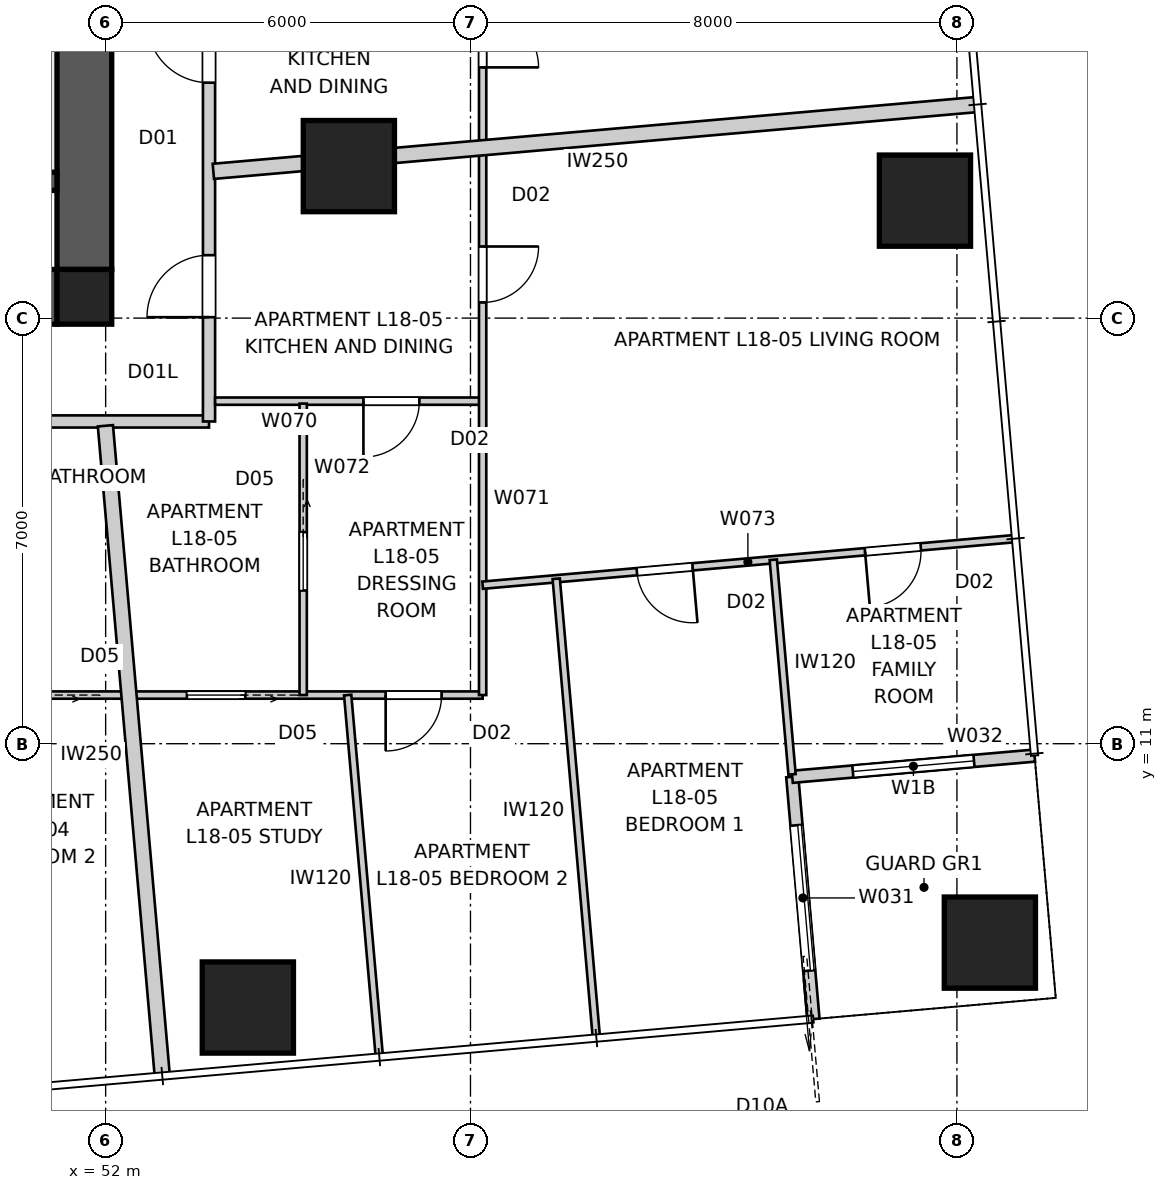
"""IFC4 building model, lengths in metres.
Left out: names, types, materials, properties, quantities, classifications, styles, units other than length and angle.
Written with IfcOpenShell. Run it as: python <this file> out.ifc"""

import sys

from ifc_helpers import new_model, si_unit, direction, frame, frame_2d, origin, origin_2d, place, context, subcontext, project, spatial, polyline, rectangle, outline, extrude, element, fill, save


model = new_model("IFC4")
c1 = context("Model", 3, precision=1e-05, world=origin(), true_north=direction((0.0, 1.0)))
c2 = subcontext(c1, "Body", "Model", "MODEL_VIEW")
j1 = project(units=[si_unit("LENGTHUNIT", "METRE"), si_unit("PLANEANGLEUNIT", "RADIAN")], contexts=[c1])
p1 = place(None, origin())
s1 = spatial("IfcSite", under=j1, at=p1, CompositionType="ELEMENT")
p2 = place(p1, origin())
s2 = spatial("IfcBuilding", under=s1, at=p2, CompositionType="ELEMENT")
p3 = place(p2, frame((0.0, 0.0, 67.6)))
s3 = spatial("IfcBuildingStorey", under=s2, at=p3, CompositionType="ELEMENT", Elevation=67.6)
p4 = place(p3, frame((51.2, 18.35, 0.0), z_axis=(0.0, 0.0, 1.0), x_axis=(-1.0, 0.0, 0.0)))
e1 = element("IfcWall", 1, at=p4, inside=s3, PredefinedType="SHEAR", context=c2, shape_type="SweptSolid", body=[
    extrude(outline(polyline([(0.0, -0.45), (22.4, -0.45), (22.4, -0.025), (22.85, -0.025), (22.85, 0.025), (22.4, 0.025), (22.4, 0.45), (0.0, 0.45), (0.0, 0.025), (-0.45, 0.025), (-0.45, -0.025), (0.0, -0.025), (0.0, -0.45)])), origin(), (0.0, 0.0, 1.0), 3.4),
])
p5 = place(p3, frame((51.65, 18.8, 0.0), z_axis=(0.0, 0.0, 1.0), x_axis=(0.0, 1.0, 0.0)))
e2 = element("IfcWall", 2, at=p5, inside=s3, PredefinedType="SHEAR", context=c2, shape_type="SweptSolid", body=[
    extrude(outline(polyline([(0.0, -0.45), (22.4, -0.45), (22.4, -0.025), (22.85, -0.025), (22.85, 0.025), (22.4, 0.025), (22.4, 0.45), (0.0, 0.45), (0.0, 0.025), (-0.45, 0.025), (-0.45, -0.025), (0.0, -0.025), (0.0, -0.45)])), origin(), (0.0, 0.0, 1.0), 3.4),
])
p6 = place(p5, frame((11.14, 0.0, 0.0)))
e3 = element("IfcOpeningElement", 3, at=p6, cuts=e2, PredefinedType="OPENING", context=c2, shape_type="SweptSolid", body=[
    extrude(rectangle(XDim=1.02, YDim=2.4, at=frame_2d((0.51, 1.2))), frame((0.0, 0.46, 0.0), z_axis=(0.0, -1.0, 0.0), x_axis=(1.0, 0.0, 0.0)), (0.0, 0.0, 1.0), 0.92),
])
p7 = place(p3, frame((51.2, 20.25, 0.0), z_axis=(0.0, 0.0, 1.0), x_axis=(-1.0, 0.0, 0.0)))
e4 = element("IfcWall", 4, at=p7, inside=s3, PredefinedType="SHEAR", context=c2, shape_type="SweptSolid", body=[
    extrude(rectangle(XDim=3.5, YDim=0.3, at=frame_2d((1.75, 0.0))), origin(), (0.0, 0.0, 1.0), 3.4),
])
p8 = place(p3, frame((51.65, 18.35, 0.0), z_axis=(0.0, 0.0, 1.0), x_axis=(1.0, 0.0, 0.0)))
e5 = element("IfcColumn", 5, at=p8, inside=s3, PredefinedType="COLUMN", context=c2, shape_type="SweptSolid", body=[
    extrude(rectangle(XDim=0.9, YDim=0.9, at=origin_2d()), origin(), (0.0, 0.0, 1.0), 3.4),
])
for number, where, z_axis, x_axis in (
    (6, (54.339, 6.661, 0.0), (0.0, 0.0, 1.0), (1.0, 0.0, 0.0)),
    (7, (66.542, 7.729, 0.0), (0.0, 0.0, 1.0), (1.0, 0.0, 0.0)),
    (8, (65.474, 19.932, 0.0), (0.0, 0.0, 1.0), (1.0, 0.0, 0.0)),
    (9, (56.0, 20.5, 0.0), (0.0, 0.0, 1.0), (1.0, 0.0, 0.0)),
):
    element("IfcColumn", number, at=place(p3, frame(where, z_axis=z_axis, x_axis=x_axis)), inside=s3, PredefinedType="COLUMN", context=c2, shape_type="SweptSolid", body=[
        extrude(rectangle(XDim=1.5, YDim=1.5, at=origin_2d()), origin(), (0.0, 0.0, 1.0), 3.4),
    ])
p9 = place(p3, frame((63.641, 6.471, 0.0), z_axis=(0.0, 0.0, 1.0), x_axis=(-0.087161650072, 0.99619418125, 0.0)))
e10 = element("IfcWall", 10, at=p9, inside=s3, PredefinedType="SOLIDWALL", context=c2, shape_type="SweptSolid", body=[
    extrude(rectangle(XDim=4.0, YDim=0.2, at=frame_2d((2.0, 0.0))), origin(), (0.0, 0.0, 1.0), 3.25),
])
p10 = place(p9, frame((0.8, 0.0, 0.0)))
e11 = element("IfcOpeningElement", 11, at=p10, cuts=e10, PredefinedType="OPENING", context=c2, shape_type="SweptSolid", body=[
    extrude(rectangle(XDim=2.4, YDim=2.1, at=frame_2d((1.2, 1.05))), frame((0.0, 0.11, 0.0), z_axis=(0.0, -1.0, 0.0), x_axis=(1.0, 0.0, 0.0)), (0.0, 0.0, 1.0), 0.22),
])
p11 = place(p3, frame((63.292, 10.456, 0.0), z_axis=(0.0, 0.0, 1.0), x_axis=(0.99619464492, 0.087156350505, 0.0)))
e12 = element("IfcWall", 12, at=p11, inside=s3, PredefinedType="SOLIDWALL", context=c2, shape_type="SweptSolid", body=[
    extrude(rectangle(XDim=4.0, YDim=0.2, at=frame_2d((2.0, 0.0))), origin(), (0.0, 0.0, 1.0), 3.25),
])
p12 = place(p11, frame((1.0, 0.0, 0.45)))
e13 = element("IfcOpeningElement", 13, at=p12, cuts=e12, PredefinedType="OPENING", context=c2, shape_type="SweptSolid", body=[
    extrude(rectangle(XDim=2.0, YDim=1.8, at=frame_2d((1.0, 0.9))), frame((0.0, 0.11, 0.0), z_axis=(0.0, -1.0, 0.0), x_axis=(1.0, 0.0, 0.0)), (0.0, 0.0, 1.0), 0.22),
])
p13 = place(p3, frame((25.5, 16.3, 0.0), z_axis=(0.0, 0.0, 1.0), x_axis=(1.0, 0.0, 0.0)))
e14 = element("IfcWall", 14, at=p13, inside=s3, PredefinedType="PARTITIONING", context=c2, shape_type="SweptSolid", body=[
    extrude(rectangle(XDim=28.2, YDim=0.2, at=frame_2d((14.1, 0.0))), origin(), (0.0, 0.0, 1.0), 3.25),
])
p14 = place(p13, frame((19.784, 0.0, 0.0)))
e15 = element("IfcOpeningElement", 15, at=p14, cuts=e14, PredefinedType="OPENING", context=c2, shape_type="SweptSolid", body=[
    extrude(rectangle(XDim=1.02, YDim=2.34, at=frame_2d((0.51, 1.17))), frame((0.0, 0.11, 0.0), z_axis=(0.0, -1.0, 0.0), x_axis=(1.0, 0.0, 0.0)), (0.0, 0.0, 1.0), 0.22),
])
p15 = place(p13, frame((13.086, 0.0, 0.0)))
e16 = element("IfcOpeningElement", 16, at=p15, cuts=e14, PredefinedType="OPENING", context=c2, shape_type="SweptSolid", body=[
    extrude(rectangle(XDim=1.02, YDim=2.34, at=frame_2d((0.51, 1.17))), frame((0.0, 0.11, 0.0), z_axis=(0.0, -1.0, 0.0), x_axis=(1.0, 0.0, 0.0)), (0.0, 0.0, 1.0), 0.22),
])
p16 = place(p13, frame((2.483, 0.0, 0.0)))
e17 = element("IfcOpeningElement", 17, at=p16, cuts=e14, PredefinedType="OPENING", context=c2, shape_type="SweptSolid", body=[
    extrude(rectangle(XDim=1.02, YDim=2.1, at=frame_2d((0.51, 1.05))), frame((0.0, 0.11, 0.0), z_axis=(0.0, -1.0, 0.0), x_axis=(1.0, 0.0, 0.0)), (0.0, 0.0, 1.0), 0.22),
])
p17 = place(p3, frame((53.7, 16.3, 0.0), z_axis=(0.0, 0.0, 1.0), x_axis=(0.0, 1.0, 0.0)))
e18 = element("IfcWall", 18, at=p17, inside=s3, PredefinedType="PARTITIONING", context=c2, shape_type="SweptSolid", body=[
    extrude(rectangle(XDim=28.2, YDim=0.2, at=frame_2d((14.1, 0.0))), origin(), (0.0, 0.0, 1.0), 3.25),
])
p18 = place(p17, frame((15.716, 0.0, 0.0)))
e19 = element("IfcOpeningElement", 19, at=p18, cuts=e18, PredefinedType="OPENING", context=c2, shape_type="SweptSolid", body=[
    extrude(rectangle(XDim=1.02, YDim=2.34, at=frame_2d((0.51, 1.17))), frame((0.0, 0.11, 0.0), z_axis=(0.0, -1.0, 0.0), x_axis=(1.0, 0.0, 0.0)), (0.0, 0.0, 1.0), 0.22),
])
p19 = place(p17, frame((5.572, 0.0, 0.0)))
e20 = element("IfcOpeningElement", 20, at=p19, cuts=e18, PredefinedType="OPENING", context=c2, shape_type="SweptSolid", body=[
    extrude(rectangle(XDim=1.02, YDim=2.34, at=frame_2d((0.51, 1.17))), frame((0.0, 0.11, 0.0), z_axis=(0.0, -1.0, 0.0), x_axis=(1.0, 0.0, 0.0)), (0.0, 0.0, 1.0), 0.22),
])
p20 = place(p17, frame((1.715, 0.0, 0.0)))
e21 = element("IfcOpeningElement", 21, at=p20, cuts=e18, PredefinedType="OPENING", context=c2, shape_type="SweptSolid", body=[
    extrude(rectangle(XDim=1.02, YDim=2.1, at=frame_2d((0.51, 1.05))), frame((0.0, 0.11, 0.0), z_axis=(0.0, -1.0, 0.0), x_axis=(1.0, 0.0, 0.0)), (0.0, 0.0, 1.0), 0.22),
])
p21 = place(p3, frame((52.932, 5.534, 0.0), z_axis=(0.0, 0.0, 1.0), x_axis=(-0.08716441141, 0.996193939644, 0.0)))
e22 = element("IfcWall", 22, at=p21, inside=s3, PredefinedType="PARTITIONING", context=c2, shape_type="SweptSolid", body=[
    extrude(rectangle(XDim=10.736, YDim=0.25, at=frame_2d((5.368, 0.0))), origin(), (0.0, 0.0, 1.0), 3.25),
])
p22 = place(p3, frame((66.34, 21.513, 0.0), z_axis=(0.0, 0.0, 1.0), x_axis=(-0.996194851608, -0.087153988028, 0.0)))
e23 = element("IfcWall", 23, at=p22, inside=s3, PredefinedType="PARTITIONING", context=c2, shape_type="SweptSolid", body=[
    extrude(rectangle(XDim=12.617, YDim=0.25, at=frame_2d((6.309, 0.0))), origin(), (0.0, 0.0, 1.0), 3.25),
])
p23 = place(p3, frame((58.2, 11.8, 0.0), z_axis=(0.0, 0.0, 1.0), x_axis=(-1.0, 0.0, 0.0)))
e24 = element("IfcWall", 24, at=p23, inside=s3, PredefinedType="PARTITIONING", context=c2, shape_type="SweptSolid", body=[
    extrude(rectangle(XDim=36.4, YDim=0.12, at=frame_2d((18.2, 0.0))), origin(), (0.0, 0.0, 1.0), 3.25),
])
p24 = place(p23, frame((11.12, 0.0, 0.0)))
e25 = element("IfcOpeningElement", 25, at=p24, cuts=e24, PredefinedType="OPENING", context=c2, shape_type="SweptSolid", body=[
    extrude(rectangle(XDim=0.92, YDim=2.34, at=frame_2d((0.46, 1.17))), frame((0.0, 0.07, 0.0), z_axis=(0.0, -1.0, 0.0), x_axis=(1.0, 0.0, 0.0)), (0.0, 0.0, 1.0), 0.14),
])
p25 = place(p23, frame((17.971, 0.0, 0.0)))
e26 = element("IfcOpeningElement", 26, at=p25, cuts=e24, PredefinedType="OPENING", context=c2, shape_type="SweptSolid", body=[
    extrude(rectangle(XDim=0.92, YDim=2.34, at=frame_2d((0.46, 1.17))), frame((0.0, 0.07, 0.0), z_axis=(0.0, -1.0, 0.0), x_axis=(1.0, 0.0, 0.0)), (0.0, 0.0, 1.0), 0.14),
])
p26 = place(p23, frame((28.877, 0.0, 0.0)))
e27 = element("IfcOpeningElement", 27, at=p26, cuts=e24, PredefinedType="OPENING", context=c2, shape_type="SweptSolid", body=[
    extrude(rectangle(XDim=0.92, YDim=2.34, at=frame_2d((0.46, 1.17))), frame((0.0, 0.07, 0.0), z_axis=(0.0, -1.0, 0.0), x_axis=(1.0, 0.0, 0.0)), (0.0, 0.0, 1.0), 0.14),
])
p27 = place(p23, frame((7.16, 0.0, 0.0)))
e28 = element("IfcOpeningElement", 28, at=p27, cuts=e24, PredefinedType="OPENING", context=c2, shape_type="SweptSolid", body=[
    extrude(rectangle(XDim=0.96, YDim=2.1, at=frame_2d((0.48, 1.05))), frame((0.0, 0.07, 0.0), z_axis=(0.0, -1.0, 0.0), x_axis=(1.0, 0.0, 0.0)), (0.0, 0.0, 1.0), 0.14),
])
p28 = place(p23, frame((15.181, 0.0, 0.0)))
e29 = element("IfcOpeningElement", 29, at=p28, cuts=e24, PredefinedType="OPENING", context=c2, shape_type="SweptSolid", body=[
    extrude(rectangle(XDim=0.96, YDim=2.1, at=frame_2d((0.48, 1.05))), frame((0.0, 0.07, 0.0), z_axis=(0.0, -1.0, 0.0), x_axis=(1.0, 0.0, 0.0)), (0.0, 0.0, 1.0), 0.14),
])
p29 = place(p23, frame((32.668, 0.0, 0.0)))
e30 = element("IfcOpeningElement", 30, at=p29, cuts=e24, PredefinedType="OPENING", context=c2, shape_type="SweptSolid", body=[
    extrude(rectangle(XDim=0.92, YDim=2.34, at=frame_2d((0.46, 1.17))), frame((0.0, 0.07, 0.0), z_axis=(0.0, -1.0, 0.0), x_axis=(1.0, 0.0, 0.0)), (0.0, 0.0, 1.0), 0.14),
])
p30 = place(p23, frame((35.011, 0.0, 0.0)))
e31 = element("IfcOpeningElement", 31, at=p30, cuts=e24, PredefinedType="OPENING", context=c2, shape_type="SweptSolid", body=[
    extrude(rectangle(XDim=0.92, YDim=2.34, at=frame_2d((0.46, 1.17))), frame((0.0, 0.07, 0.0), z_axis=(0.0, -1.0, 0.0), x_axis=(1.0, 0.0, 0.0)), (0.0, 0.0, 1.0), 0.14),
])
p31 = place(p23, frame((0.675, 0.0, 0.0)))
e32 = element("IfcOpeningElement", 32, at=p31, cuts=e24, PredefinedType="OPENING", context=c2, shape_type="SweptSolid", body=[
    extrude(rectangle(XDim=0.92, YDim=2.34, at=frame_2d((0.46, 1.17))), frame((0.0, 0.07, 0.0), z_axis=(0.0, -1.0, 0.0), x_axis=(1.0, 0.0, 0.0)), (0.0, 0.0, 1.0), 0.14),
])
p32 = place(p23, frame((25.11, 0.0, 0.0)))
e33 = element("IfcOpeningElement", 33, at=p32, cuts=e24, PredefinedType="OPENING", context=c2, shape_type="SweptSolid", body=[
    extrude(rectangle(XDim=0.96, YDim=2.1, at=frame_2d((0.48, 1.05))), frame((0.0, 0.07, 0.0), z_axis=(0.0, -1.0, 0.0), x_axis=(1.0, 0.0, 0.0)), (0.0, 0.0, 1.0), 0.14),
])
p33 = place(p23, frame((3.904, 0.0, 0.0)))
e34 = element("IfcOpeningElement", 34, at=p33, cuts=e24, PredefinedType="OPENING", context=c2, shape_type="SweptSolid", body=[
    extrude(rectangle(XDim=0.96, YDim=2.1, at=frame_2d((0.48, 1.05))), frame((0.0, 0.07, 0.0), z_axis=(0.0, -1.0, 0.0), x_axis=(1.0, 0.0, 0.0)), (0.0, 0.0, 1.0), 0.14),
])
p34 = place(p3, frame((58.2, 16.634, 0.0), z_axis=(0.0, 0.0, 1.0), x_axis=(-1.0, 0.0, 0.0)))
e35 = element("IfcWall", 35, at=p34, inside=s3, PredefinedType="PARTITIONING", context=c2, shape_type="SweptSolid", body=[
    extrude(rectangle(XDim=4.4, YDim=0.12, at=frame_2d((2.2, 0.0))), origin(), (0.0, 0.0, 1.0), 3.25),
])
p35 = place(p34, frame((1.041, 0.0, 0.0)))
e36 = element("IfcOpeningElement", 36, at=p35, cuts=e35, PredefinedType="OPENING", context=c2, shape_type="SweptSolid", body=[
    extrude(rectangle(XDim=0.92, YDim=2.34, at=frame_2d((0.46, 1.17))), frame((0.0, 0.07, 0.0), z_axis=(0.0, -1.0, 0.0), x_axis=(1.0, 0.0, 0.0)), (0.0, 0.0, 1.0), 0.14),
])
p36 = place(p3, frame((58.2, 24.366, 0.0), z_axis=(0.0, 0.0, 1.0), x_axis=(0.0, -1.0, 0.0)))
e37 = element("IfcWall", 37, at=p36, inside=s3, PredefinedType="PARTITIONING", context=c2, shape_type="SweptSolid", body=[
    extrude(rectangle(XDim=12.566, YDim=0.12, at=frame_2d((6.283, 0.0))), origin(), (0.0, 0.0, 1.0), 3.25),
])
p37 = place(p36, frame((1.322, 0.0, 0.0)))
e38 = element("IfcOpeningElement", 38, at=p37, cuts=e37, PredefinedType="OPENING", context=c2, shape_type="SweptSolid", body=[
    extrude(rectangle(XDim=0.92, YDim=2.34, at=frame_2d((0.46, 1.17))), frame((0.0, 0.07, 0.0), z_axis=(0.0, -1.0, 0.0), x_axis=(1.0, 0.0, 0.0)), (0.0, 0.0, 1.0), 0.14),
])
p38 = place(p36, frame((5.188, 0.0, 0.0)))
e39 = element("IfcOpeningElement", 39, at=p38, cuts=e37, PredefinedType="OPENING", context=c2, shape_type="SweptSolid", body=[
    extrude(rectangle(XDim=0.92, YDim=2.34, at=frame_2d((0.46, 1.17))), frame((0.0, 0.07, 0.0), z_axis=(0.0, -1.0, 0.0), x_axis=(1.0, 0.0, 0.0)), (0.0, 0.0, 1.0), 0.14),
])
p39 = place(p3, frame((55.249, 16.594, 0.0), z_axis=(0.0, 0.0, 1.0), x_axis=(0.0, -1.0, 0.0)))
e40 = element("IfcWall", 40, at=p39, inside=s3, PredefinedType="PARTITIONING", context=c2, shape_type="SweptSolid", body=[
    extrude(rectangle(XDim=4.794, YDim=0.12, at=frame_2d((2.397, 0.0))), origin(), (0.0, 0.0, 1.0), 3.25),
])
p40 = place(p39, frame((2.114, 0.0, 0.0)))
e41 = element("IfcOpeningElement", 41, at=p40, cuts=e40, PredefinedType="OPENING", context=c2, shape_type="SweptSolid", body=[
    extrude(rectangle(XDim=0.96, YDim=2.1, at=frame_2d((0.48, 1.05))), frame((0.0, 0.07, 0.0), z_axis=(0.0, -1.0, 0.0), x_axis=(1.0, 0.0, 0.0)), (0.0, 0.0, 1.0), 0.14),
])
p41 = place(p3, frame((66.925, 14.371, 0.0), z_axis=(0.0, 0.0, 1.0), x_axis=(-0.996193475426, -0.087169716747, 0.0)))
e42 = element("IfcWall", 42, at=p41, inside=s3, PredefinedType="PARTITIONING", context=c2, shape_type="SweptSolid", body=[
    extrude(rectangle(XDim=8.758, YDim=0.12, at=frame_2d((4.379, 0.0))), origin(), (0.0, 0.0, 1.0), 3.25),
])
p42 = place(p41, frame((1.525, 0.0, 0.0)))
e43 = element("IfcOpeningElement", 43, at=p42, cuts=e42, PredefinedType="OPENING", context=c2, shape_type="SweptSolid", body=[
    extrude(rectangle(XDim=0.92, YDim=2.34, at=frame_2d((0.46, 1.17))), frame((0.0, 0.07, 0.0), z_axis=(0.0, -1.0, 0.0), x_axis=(1.0, 0.0, 0.0)), (0.0, 0.0, 1.0), 0.14),
])
p43 = place(p41, frame((5.292, 0.0, 0.0)))
e44 = element("IfcOpeningElement", 44, at=p43, cuts=e42, PredefinedType="OPENING", context=c2, shape_type="SweptSolid", body=[
    extrude(rectangle(XDim=0.92, YDim=2.34, at=frame_2d((0.46, 1.17))), frame((0.0, 0.07, 0.0), z_axis=(0.0, -1.0, 0.0), x_axis=(1.0, 0.0, 0.0)), (0.0, 0.0, 1.0), 0.14),
])
p44 = place(p3, frame((60.067, 6.198, 0.0), z_axis=(0.0, 0.0, 1.0), x_axis=(-0.087158920508, 0.996194420069, 0.0)))
e45 = element("IfcWall", 45, at=p44, inside=s3, PredefinedType="PARTITIONING", context=c2, shape_type="SweptSolid", body=[
    extrude(rectangle(XDim=7.543, YDim=0.12, at=frame_2d((3.772, 0.0))), origin(), (0.0, 0.0, 1.0), 3.25),
])
p45 = place(p3, frame((62.98, 14.025, 0.0), z_axis=(0.0, 0.0, 1.0), x_axis=(0.087161821847, -0.996194166221, 0.0)))
e46 = element("IfcWall", 46, at=p45, inside=s3, PredefinedType="PARTITIONING", context=c2, shape_type="SweptSolid", body=[
    extrude(rectangle(XDim=3.543, YDim=0.12, at=frame_2d((1.771, 0.0))), origin(), (0.0, 0.0, 1.0), 3.25),
])
p46 = place(p3, frame((56.498, 5.886, 0.0), z_axis=(0.0, 0.0, 1.0), x_axis=(-0.087146033323, 0.996195547509, 0.0)))
e47 = element("IfcWall", 47, at=p46, inside=s3, PredefinedType="PARTITIONING", context=c2, shape_type="SweptSolid", body=[
    extrude(rectangle(XDim=5.937, YDim=0.12, at=frame_2d((2.968, 0.0))), origin(), (0.0, 0.0, 1.0), 2.638),
])
p47 = place(p10, origin())
e48 = element("IfcDoor", 48, at=p47, inside=s3, OperationType="SLIDING_TO_LEFT", PredefinedType="DOOR", context=c2, shape_type="SweptSolid", body=[
    extrude(rectangle(XDim=2.4, YDim=2.1, at=frame_2d((1.2, 1.05))), frame((0.0, 0.025, 0.0), z_axis=(0.0, -1.0, 0.0), x_axis=(1.0, 0.0, 0.0)), (0.0, 0.0, 1.0), 0.05),
])
fill(e11, e48)
p48 = place(p12, origin())
e49 = element("IfcWindow", 49, at=p48, inside=s3, PartitioningType="SINGLE_PANEL", PredefinedType="WINDOW", context=c2, shape_type="SweptSolid", body=[
    extrude(rectangle(XDim=2.0, YDim=1.8, at=frame_2d((1.0, 0.9))), frame((0.0, 0.03, 0.0), z_axis=(0.0, -1.0, 0.0), x_axis=(1.0, 0.0, 0.0)), (0.0, 0.0, 1.0), 0.06),
])
fill(e13, e49)
p49 = place(p19, origin())
e50 = element("IfcDoor", 50, at=p49, inside=s3, OperationType="SINGLE_SWING_RIGHT", PredefinedType="DOOR", context=c2, shape_type="SweptSolid", body=[
    extrude(rectangle(XDim=1.02, YDim=2.34, at=frame_2d((0.51, 1.17))), frame((0.0, 0.025, 0.0), z_axis=(0.0, -1.0, 0.0), x_axis=(1.0, 0.0, 0.0)), (0.0, 0.0, 1.0), 0.05),
])
fill(e20, e50)
p50 = place(p20, origin())
e51 = element("IfcDoor", 51, at=p50, inside=s3, OperationType="SINGLE_SWING_LEFT", PredefinedType="DOOR", context=c2, shape_type="SweptSolid", body=[
    extrude(rectangle(XDim=1.02, YDim=2.1, at=frame_2d((0.51, 1.05))), frame((0.0, 0.025, 0.0), z_axis=(0.0, -1.0, 0.0), x_axis=(1.0, 0.0, 0.0)), (0.0, 0.0, 1.0), 0.05),
])
fill(e21, e51)
p51 = place(p37, origin())
e52 = element("IfcDoor", 52, at=p51, inside=s3, OperationType="SINGLE_SWING_RIGHT", PredefinedType="DOOR", context=c2, shape_type="SweptSolid", body=[
    extrude(rectangle(XDim=0.92, YDim=2.34, at=frame_2d((0.46, 1.17))), frame((0.0, 0.025, 0.0), z_axis=(0.0, -1.0, 0.0), x_axis=(1.0, 0.0, 0.0)), (0.0, 0.0, 1.0), 0.05),
])
fill(e38, e52)
p52 = place(p38, origin())
e53 = element("IfcDoor", 53, at=p52, inside=s3, OperationType="SINGLE_SWING_LEFT", PredefinedType="DOOR", context=c2, shape_type="SweptSolid", body=[
    extrude(rectangle(XDim=0.92, YDim=2.34, at=frame_2d((0.46, 1.17))), frame((0.0, 0.025, 0.0), z_axis=(0.0, -1.0, 0.0), x_axis=(1.0, 0.0, 0.0)), (0.0, 0.0, 1.0), 0.05),
])
fill(e39, e53)
p53 = place(p35, origin())
e54 = element("IfcDoor", 54, at=p53, inside=s3, OperationType="SINGLE_SWING_RIGHT", PredefinedType="DOOR", context=c2, shape_type="SweptSolid", body=[
    extrude(rectangle(XDim=0.92, YDim=2.34, at=frame_2d((0.46, 1.17))), frame((0.0, 0.025, 0.0), z_axis=(0.0, -1.0, 0.0), x_axis=(1.0, 0.0, 0.0)), (0.0, 0.0, 1.0), 0.05),
])
fill(e36, e54)
p54 = place(p42, origin())
e55 = element("IfcDoor", 55, at=p54, inside=s3, OperationType="SINGLE_SWING_RIGHT", PredefinedType="DOOR", context=c2, shape_type="SweptSolid", body=[
    extrude(rectangle(XDim=0.92, YDim=2.34, at=frame_2d((0.46, 1.17))), frame((0.0, 0.025, 0.0), z_axis=(0.0, -1.0, 0.0), x_axis=(1.0, 0.0, 0.0)), (0.0, 0.0, 1.0), 0.05),
])
fill(e43, e55)
p55 = place(p43, origin())
e56 = element("IfcDoor", 56, at=p55, inside=s3, OperationType="SINGLE_SWING_LEFT", PredefinedType="DOOR", context=c2, shape_type="SweptSolid", body=[
    extrude(rectangle(XDim=0.92, YDim=2.34, at=frame_2d((0.46, 1.17))), frame((0.0, 0.025, 0.0), z_axis=(0.0, -1.0, 0.0), x_axis=(1.0, 0.0, 0.0)), (0.0, 0.0, 1.0), 0.05),
])
fill(e44, e56)
p56 = place(p40, origin())
e57 = element("IfcDoor", 57, at=p56, inside=s3, OperationType="SLIDING_TO_LEFT", PredefinedType="DOOR", context=c2, shape_type="SweptSolid", body=[
    extrude(rectangle(XDim=0.96, YDim=2.1, at=frame_2d((0.48, 1.05))), frame((0.0, 0.025, 0.0), z_axis=(0.0, -1.0, 0.0), x_axis=(1.0, 0.0, 0.0)), (0.0, 0.0, 1.0), 0.05),
])
fill(e41, e57)
p57 = place(p31, origin())
e58 = element("IfcDoor", 58, at=p57, inside=s3, OperationType="SINGLE_SWING_RIGHT", PredefinedType="DOOR", context=c2, shape_type="SweptSolid", body=[
    extrude(rectangle(XDim=0.92, YDim=2.34, at=frame_2d((0.46, 1.17))), frame((0.0, 0.025, 0.0), z_axis=(0.0, -1.0, 0.0), x_axis=(1.0, 0.0, 0.0)), (0.0, 0.0, 1.0), 0.05),
])
fill(e32, e58)
p58 = place(p33, origin())
e59 = element("IfcDoor", 59, at=p58, inside=s3, OperationType="SLIDING_TO_LEFT", PredefinedType="DOOR", context=c2, shape_type="SweptSolid", body=[
    extrude(rectangle(XDim=0.96, YDim=2.1, at=frame_2d((0.48, 1.05))), frame((0.0, 0.025, 0.0), z_axis=(0.0, -1.0, 0.0), x_axis=(1.0, 0.0, 0.0)), (0.0, 0.0, 1.0), 0.05),
])
fill(e34, e59)
save(model, sys.argv[1])
